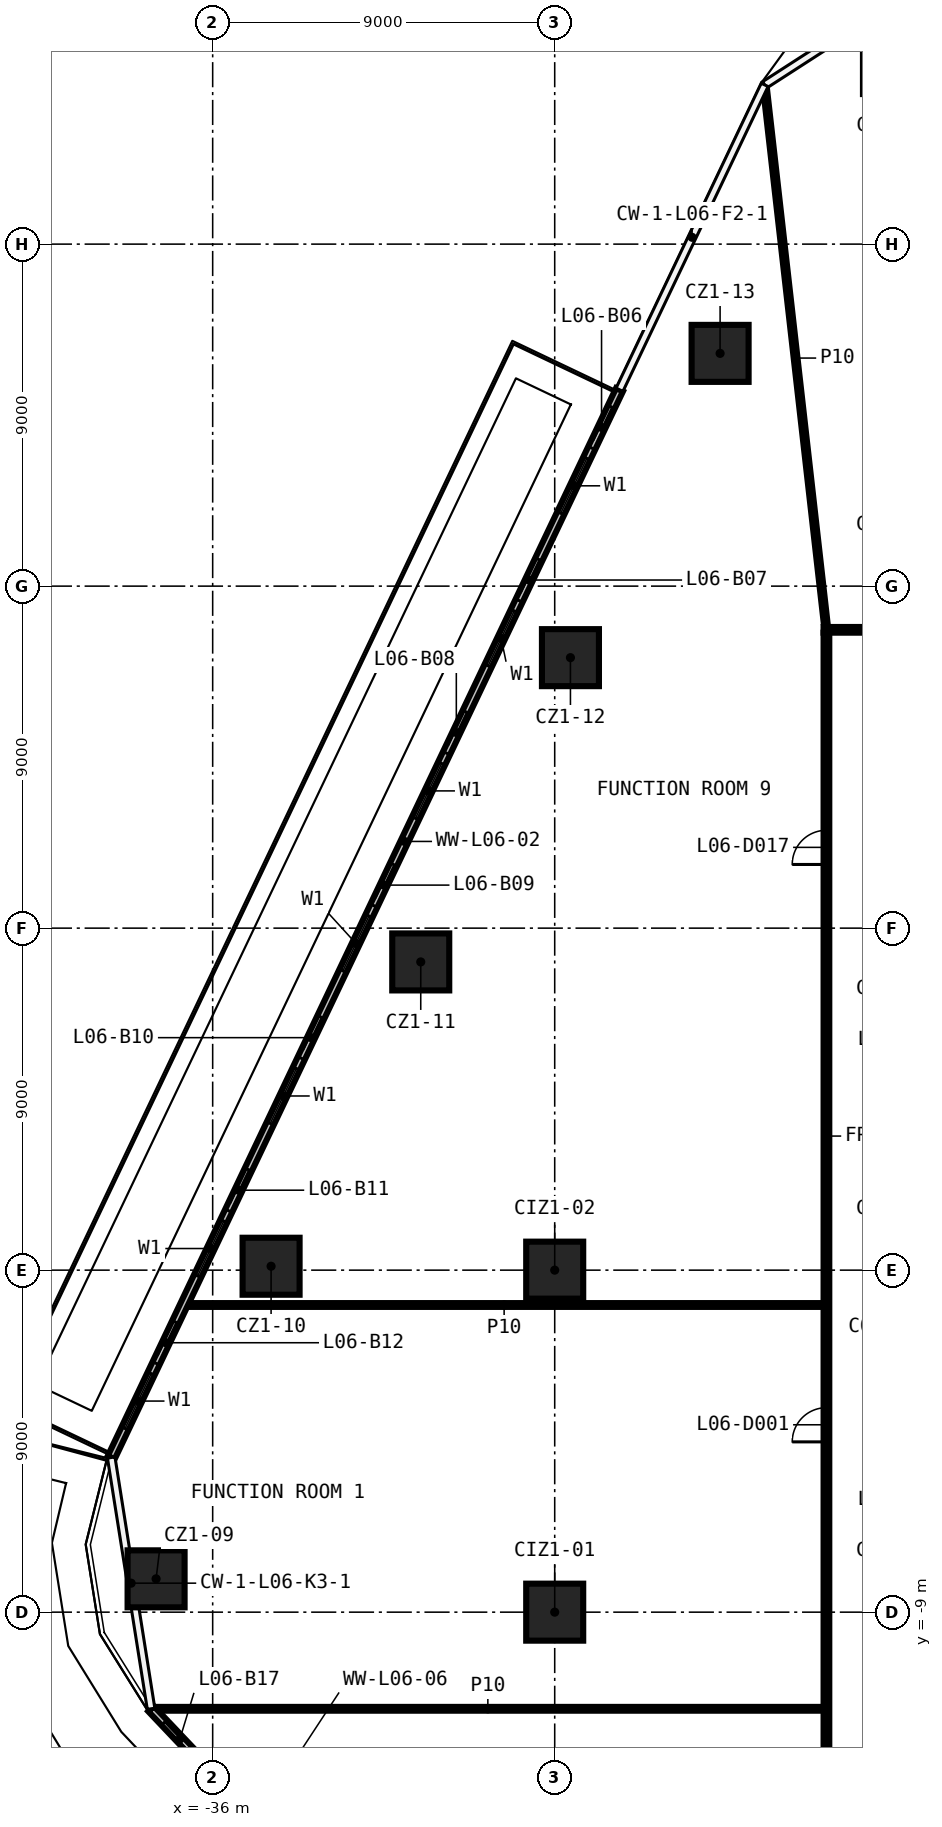
"""IFC4 building model, lengths in metres.
Left out: names, types, materials, properties, quantities, classifications, styles, units other than length and angle.
Written with IfcOpenShell. Run it as: python <this file> out.ifc"""

import sys

from ifc_helpers import new_model, si_unit, direction, frame, frame_2d, origin, origin_2d, place, context, subcontext, project, spatial, rectangle, extrude, element, fill, save


model = new_model("IFC4")
c1 = context("Model", 3, precision=1e-05, world=origin(), true_north=direction((0.0, 1.0)))
c2 = subcontext(c1, "Body", "Model", "MODEL_VIEW")
j1 = project(units=[si_unit("LENGTHUNIT", "METRE"), si_unit("PLANEANGLEUNIT", "RADIAN")], contexts=[c1])
p1 = place(None, origin())
s1 = spatial("IfcSite", under=j1, at=p1, CompositionType="ELEMENT")
p2 = place(p1, origin())
s2 = spatial("IfcBuilding", under=s1, at=p2, CompositionType="ELEMENT")
p3 = place(p2, frame((0.0, 0.0, 44.0)))
s3 = spatial("IfcBuildingStorey", under=s2, at=p3, CompositionType="ELEMENT", Elevation=44.0)
for number, where, z_axis, x_axis in (
    (1, (-37.489, -8.123, 0.0), (0.0, 0.0, 1.0), (1.0, 0.0, 0.0)),
    (2, (-34.463, 0.103, 0.0), (0.0, 0.0, 1.0), (1.0, 0.0, 0.0)),
    (3, (-30.525, 8.111, 0.0), (0.0, 0.0, 1.0), (1.0, 0.0, 0.0)),
    (4, (-26.586, 16.118, 0.0), (0.0, 0.0, 1.0), (1.0, 0.0, 0.0)),
    (5, (-22.648, 24.125, 0.0), (0.0, 0.0, 1.0), (1.0, 0.0, 0.0)),
    (6, (-27.0, -9.0, 0.0), (0.0, 0.0, 1.0), (1.0, 0.0, 0.0)),
    (7, (-27.0, 0.0, 0.0), (0.0, 0.0, 1.0), (1.0, 0.0, 0.0)),
):
    element("IfcColumn", number, at=place(p3, frame(where, z_axis=z_axis, x_axis=x_axis)), inside=s3, PredefinedType="COLUMN", context=c2, shape_type="SweptSolid", body=[
        extrude(rectangle(XDim=1.5, YDim=1.5, at=origin_2d()), origin(), (0.0, 0.0, 1.0), 3.3),
    ])
p4 = place(p3, frame((-37.594, -11.543, 0.0), z_axis=(0.0, 0.0, 1.0), x_axis=(1.0, 0.0, 0.0)))
e8 = element("IfcWall", 8, at=p4, inside=s3, PredefinedType="PARTITIONING", context=c2, shape_type="SweptSolid", body=[
    extrude(rectangle(XDim=17.668, YDim=0.1, at=frame_2d((8.834, 0.0))), origin(), (0.0, 0.0, 1.0), 3.3),
])
p5 = place(p3, frame((-36.737, -0.917, 0.0), z_axis=(0.0, 0.0, 1.0), x_axis=(1.0, 0.0, 0.0)))
e9 = element("IfcWall", 9, at=p5, inside=s3, PredefinedType="PARTITIONING", context=c2, shape_type="SweptSolid", body=[
    extrude(rectangle(XDim=16.812, YDim=0.1, at=frame_2d((8.406, 0.0))), origin(), (0.0, 0.0, 1.0), 3.3),
])
p6 = place(p3, frame((-19.925, 16.85, 0.0), z_axis=(0.0, 0.0, 1.0), x_axis=(1.0, 0.0, 0.0)))
e10 = element("IfcWall", 10, at=p6, inside=s3, PredefinedType="PARTITIONING", context=c2, shape_type="SweptSolid", body=[
    extrude(rectangle(XDim=39.85, YDim=0.15, at=frame_2d((19.925, 0.0))), origin(), (0.0, 0.0, 1.0), 3.3),
])
p7 = place(p6, frame((31.643, 0.0, 0.0)))
e11 = element("IfcOpeningElement", 11, at=p7, cuts=e10, PredefinedType="OPENING", context=c2, shape_type="SweptSolid", body=[
    extrude(rectangle(XDim=0.9, YDim=2.1, at=frame_2d((0.45, 1.05))), frame((0.0, 0.085, 0.0), z_axis=(0.0, -1.0, 0.0), x_axis=(1.0, 0.0, 0.0)), (0.0, 0.0, 1.0), 0.17),
])
p8 = place(p6, frame((22.056, 0.0, 0.0)))
e12 = element("IfcOpeningElement", 12, at=p8, cuts=e10, PredefinedType="OPENING", context=c2, shape_type="SweptSolid", body=[
    extrude(rectangle(XDim=0.9, YDim=2.1, at=frame_2d((0.45, 1.05))), frame((0.0, 0.085, 0.0), z_axis=(0.0, -1.0, 0.0), x_axis=(1.0, 0.0, 0.0)), (0.0, 0.0, 1.0), 0.17),
])
p9 = place(p6, frame((14.831, 0.0, 0.0)))
e13 = element("IfcOpeningElement", 13, at=p9, cuts=e10, PredefinedType="OPENING", context=c2, shape_type="SweptSolid", body=[
    extrude(rectangle(XDim=1.0, YDim=2.1, at=frame_2d((0.5, 1.05))), frame((0.0, 0.085, 0.0), z_axis=(0.0, -1.0, 0.0), x_axis=(1.0, 0.0, 0.0)), (0.0, 0.0, 1.0), 0.17),
])
p10 = place(p3, frame((-19.85, -16.775, 0.0), z_axis=(0.0, 0.0, 1.0), x_axis=(0.0, 1.0, 0.0)))
e14 = element("IfcWall", 14, at=p10, inside=s3, PredefinedType="PARTITIONING", context=c2, shape_type="SweptSolid", body=[
    extrude(rectangle(XDim=33.55, YDim=0.15, at=frame_2d((16.775, 0.0))), origin(), (0.0, 0.0, 1.0), 3.3),
])
p11 = place(p10, frame((12.256, 0.0, 0.0)))
e15 = element("IfcOpeningElement", 15, at=p11, cuts=e14, PredefinedType="OPENING", context=c2, shape_type="SweptSolid", body=[
    extrude(rectangle(XDim=0.9, YDim=2.1, at=frame_2d((0.45, 1.05))), frame((0.0, 0.085, 0.0), z_axis=(0.0, -1.0, 0.0), x_axis=(1.0, 0.0, 0.0)), (0.0, 0.0, 1.0), 0.17),
])
p12 = place(p10, frame((3.254, 0.0, 0.0)))
e16 = element("IfcOpeningElement", 16, at=p12, cuts=e14, PredefinedType="OPENING", context=c2, shape_type="SweptSolid", body=[
    extrude(rectangle(XDim=0.9, YDim=2.1, at=frame_2d((0.45, 1.05))), frame((0.0, 0.085, 0.0), z_axis=(0.0, -1.0, 0.0), x_axis=(1.0, 0.0, 0.0)), (0.0, 0.0, 1.0), 0.17),
])
p13 = place(p10, frame((27.451, 0.0, 0.0)))
e17 = element("IfcOpeningElement", 17, at=p13, cuts=e14, PredefinedType="OPENING", context=c2, shape_type="SweptSolid", body=[
    extrude(rectangle(XDim=0.9, YDim=2.1, at=frame_2d((0.45, 1.05))), frame((0.0, 0.085, 0.0), z_axis=(0.0, -1.0, 0.0), x_axis=(1.0, 0.0, 0.0)), (0.0, 0.0, 1.0), 0.17),
])
p14 = place(p3, frame((-21.472, 31.153, 0.0), z_axis=(0.0, 0.0, 1.0), x_axis=(0.112685540228, -0.993630700524, 0.0)))
e18 = element("IfcWall", 18, at=p14, inside=s3, PredefinedType="PARTITIONING", context=c2, shape_type="SweptSolid", body=[
    extrude(rectangle(XDim=14.395, YDim=0.1, at=frame_2d((7.197, 0.0))), origin(), (0.0, 0.0, 1.0), 3.3),
])
p15 = place(p3, frame((-25.295, 23.168, 0.0), z_axis=(0.0, 0.0, 1.0), x_axis=(-0.429791665344, -0.902928083737, 0.0)))
e19 = element("IfcWall", 19, at=p15, inside=s3, PredefinedType="SOLIDWALL", context=c2, shape_type="SweptSolid", body=[
    extrude(rectangle(XDim=31.12, YDim=0.2, at=frame_2d((15.56, 0.0))), origin(), (0.0, 0.0, 1.0), 3.3),
])
p16 = place(p15, frame((2.0, 0.0, 0.6)))
e20 = element("IfcOpeningElement", 20, at=p16, cuts=e19, PredefinedType="OPENING", context=c2, shape_type="SweptSolid", body=[
    extrude(rectangle(XDim=1.6, YDim=2.4, at=frame_2d((0.8, 1.2))), frame((0.0, 0.11, 0.0), z_axis=(0.0, -1.0, 0.0), x_axis=(1.0, 0.0, 0.0)), (0.0, 0.0, 1.0), 0.22),
])
p17 = place(p15, frame((0.5, 0.0, 0.0)))
e21 = element("IfcOpeningElement", 21, at=p17, cuts=e19, PredefinedType="OPENING", context=c2, shape_type="SweptSolid", body=[
    extrude(rectangle(XDim=1.2, YDim=2.4, at=frame_2d((0.6, 1.2))), frame((0.0, 0.11, 0.0), z_axis=(0.0, -1.0, 0.0), x_axis=(1.0, 0.0, 0.0)), (0.0, 0.0, 1.0), 0.22),
])
p18 = place(p15, frame((6.446, 0.0, 0.6)))
e22 = element("IfcOpeningElement", 22, at=p18, cuts=e19, PredefinedType="OPENING", context=c2, shape_type="SweptSolid", body=[
    extrude(rectangle(XDim=1.6, YDim=2.4, at=frame_2d((0.8, 1.2))), frame((0.0, 0.11, 0.0), z_axis=(0.0, -1.0, 0.0), x_axis=(1.0, 0.0, 0.0)), (0.0, 0.0, 1.0), 0.22),
])
p19 = place(p15, frame((4.946, 0.0, 0.0)))
e23 = element("IfcOpeningElement", 23, at=p19, cuts=e19, PredefinedType="OPENING", context=c2, shape_type="SweptSolid", body=[
    extrude(rectangle(XDim=1.2, YDim=2.4, at=frame_2d((0.6, 1.2))), frame((0.0, 0.11, 0.0), z_axis=(0.0, -1.0, 0.0), x_axis=(1.0, 0.0, 0.0)), (0.0, 0.0, 1.0), 0.22),
])
p20 = place(p15, frame((10.891, 0.0, 0.6)))
e24 = element("IfcOpeningElement", 24, at=p20, cuts=e19, PredefinedType="OPENING", context=c2, shape_type="SweptSolid", body=[
    extrude(rectangle(XDim=1.6, YDim=2.4, at=frame_2d((0.8, 1.2))), frame((0.0, 0.11, 0.0), z_axis=(0.0, -1.0, 0.0), x_axis=(1.0, 0.0, 0.0)), (0.0, 0.0, 1.0), 0.22),
])
p21 = place(p15, frame((9.391, 0.0, 0.0)))
e25 = element("IfcOpeningElement", 25, at=p21, cuts=e19, PredefinedType="OPENING", context=c2, shape_type="SweptSolid", body=[
    extrude(rectangle(XDim=1.2, YDim=2.4, at=frame_2d((0.6, 1.2))), frame((0.0, 0.11, 0.0), z_axis=(0.0, -1.0, 0.0), x_axis=(1.0, 0.0, 0.0)), (0.0, 0.0, 1.0), 0.22),
])
p22 = place(p15, frame((15.337, 0.0, 0.6)))
e26 = element("IfcOpeningElement", 26, at=p22, cuts=e19, PredefinedType="OPENING", context=c2, shape_type="SweptSolid", body=[
    extrude(rectangle(XDim=1.6, YDim=2.4, at=frame_2d((0.8, 1.2))), frame((0.0, 0.11, 0.0), z_axis=(0.0, -1.0, 0.0), x_axis=(1.0, 0.0, 0.0)), (0.0, 0.0, 1.0), 0.22),
])
p23 = place(p15, frame((13.837, 0.0, 0.0)))
e27 = element("IfcOpeningElement", 27, at=p23, cuts=e19, PredefinedType="OPENING", context=c2, shape_type="SweptSolid", body=[
    extrude(rectangle(XDim=1.2, YDim=2.4, at=frame_2d((0.6, 1.2))), frame((0.0, 0.11, 0.0), z_axis=(0.0, -1.0, 0.0), x_axis=(1.0, 0.0, 0.0)), (0.0, 0.0, 1.0), 0.22),
])
p24 = place(p15, frame((19.783, 0.0, 0.6)))
e28 = element("IfcOpeningElement", 28, at=p24, cuts=e19, PredefinedType="OPENING", context=c2, shape_type="SweptSolid", body=[
    extrude(rectangle(XDim=1.6, YDim=2.4, at=frame_2d((0.8, 1.2))), frame((0.0, 0.11, 0.0), z_axis=(0.0, -1.0, 0.0), x_axis=(1.0, 0.0, 0.0)), (0.0, 0.0, 1.0), 0.22),
])
p25 = place(p15, frame((18.283, 0.0, 0.0)))
e29 = element("IfcOpeningElement", 29, at=p25, cuts=e19, PredefinedType="OPENING", context=c2, shape_type="SweptSolid", body=[
    extrude(rectangle(XDim=1.2, YDim=2.4, at=frame_2d((0.6, 1.2))), frame((0.0, 0.11, 0.0), z_axis=(0.0, -1.0, 0.0), x_axis=(1.0, 0.0, 0.0)), (0.0, 0.0, 1.0), 0.22),
])
p26 = place(p15, frame((24.229, 0.0, 0.6)))
e30 = element("IfcOpeningElement", 30, at=p26, cuts=e19, PredefinedType="OPENING", context=c2, shape_type="SweptSolid", body=[
    extrude(rectangle(XDim=1.6, YDim=2.4, at=frame_2d((0.8, 1.2))), frame((0.0, 0.11, 0.0), z_axis=(0.0, -1.0, 0.0), x_axis=(1.0, 0.0, 0.0)), (0.0, 0.0, 1.0), 0.22),
])
p27 = place(p15, frame((22.729, 0.0, 0.0)))
e31 = element("IfcOpeningElement", 31, at=p27, cuts=e19, PredefinedType="OPENING", context=c2, shape_type="SweptSolid", body=[
    extrude(rectangle(XDim=1.2, YDim=2.4, at=frame_2d((0.6, 1.2))), frame((0.0, 0.11, 0.0), z_axis=(0.0, -1.0, 0.0), x_axis=(1.0, 0.0, 0.0)), (0.0, 0.0, 1.0), 0.22),
])
p28 = place(p15, frame((28.674, 0.0, 0.6)))
e32 = element("IfcOpeningElement", 32, at=p28, cuts=e19, PredefinedType="OPENING", context=c2, shape_type="SweptSolid", body=[
    extrude(rectangle(XDim=1.6, YDim=2.4, at=frame_2d((0.8, 1.2))), frame((0.0, 0.11, 0.0), z_axis=(0.0, -1.0, 0.0), x_axis=(1.0, 0.0, 0.0)), (0.0, 0.0, 1.0), 0.22),
])
p29 = place(p15, frame((27.174, 0.0, 0.0)))
e33 = element("IfcOpeningElement", 33, at=p29, cuts=e19, PredefinedType="OPENING", context=c2, shape_type="SweptSolid", body=[
    extrude(rectangle(XDim=1.2, YDim=2.4, at=frame_2d((0.6, 1.2))), frame((0.0, 0.11, 0.0), z_axis=(0.0, -1.0, 0.0), x_axis=(1.0, 0.0, 0.0)), (0.0, 0.0, 1.0), 0.22),
])
p30 = place(p3, frame((-37.621, -11.543, 0.0), z_axis=(0.0, 0.0, 1.0), x_axis=(0.688100005166, -0.725615864553, 0.0)))
e34 = element("IfcWall", 34, at=p30, inside=s3, PredefinedType="SOLIDWALL", context=c2, shape_type="SweptSolid", body=[
    extrude(rectangle(XDim=4.21, YDim=0.2, at=frame_2d((2.105, 0.0))), origin(), (0.0, 0.0, 1.0), 3.3),
])
p31 = place(p30, frame((2.0, 0.0, 0.6)))
e35 = element("IfcOpeningElement", 35, at=p31, cuts=e34, PredefinedType="OPENING", context=c2, shape_type="SweptSolid", body=[
    extrude(rectangle(XDim=1.6, YDim=2.4, at=frame_2d((0.8, 1.2))), frame((0.0, 0.11, 0.0), z_axis=(0.0, -1.0, 0.0), x_axis=(1.0, 0.0, 0.0)), (0.0, 0.0, 1.0), 0.22),
])
p32 = place(p30, frame((0.5, 0.0, 0.0)))
e36 = element("IfcOpeningElement", 36, at=p32, cuts=e34, PredefinedType="OPENING", context=c2, shape_type="SweptSolid", body=[
    extrude(rectangle(XDim=1.2, YDim=2.4, at=frame_2d((0.6, 1.2))), frame((0.0, 0.11, 0.0), z_axis=(0.0, -1.0, 0.0), x_axis=(1.0, 0.0, 0.0)), (0.0, 0.0, 1.0), 0.22),
])
p33 = place(p11, origin())
e37 = element("IfcDoor", 37, at=p33, inside=s3, OperationType="SINGLE_SWING_RIGHT", PredefinedType="DOOR", context=c2, shape_type="SweptSolid", body=[
    extrude(rectangle(XDim=0.9, YDim=2.1, at=frame_2d((0.45, 1.05))), frame((0.0, 0.025, 0.0), z_axis=(0.0, -1.0, 0.0), x_axis=(1.0, 0.0, 0.0)), (0.0, 0.0, 1.0), 0.05),
])
fill(e15, e37)
p34 = place(p13, origin())
e38 = element("IfcDoor", 38, at=p34, inside=s3, OperationType="SINGLE_SWING_LEFT", PredefinedType="DOOR", context=c2, shape_type="SweptSolid", body=[
    extrude(rectangle(XDim=0.9, YDim=2.1, at=frame_2d((0.45, 1.05))), frame((0.0, 0.025, 0.0), z_axis=(0.0, -1.0, 0.0), x_axis=(1.0, 0.0, 0.0)), (0.0, 0.0, 1.0), 0.05),
])
fill(e17, e38)
p35 = place(p16, origin())
e39 = element("IfcWindow", 39, at=p35, inside=s3, PartitioningType="SINGLE_PANEL", PredefinedType="WINDOW", context=c2, shape_type="SweptSolid", body=[
    extrude(rectangle(XDim=1.6, YDim=2.4, at=frame_2d((0.8, 1.2))), frame((0.0, 0.03, 0.0), z_axis=(0.0, -1.0, 0.0), x_axis=(1.0, 0.0, 0.0)), (0.0, 0.0, 1.0), 0.06),
])
fill(e20, e39)
p36 = place(p17, origin())
e40 = element("IfcDoor", 40, at=p36, inside=s3, OperationType="SLIDING_TO_LEFT", PredefinedType="DOOR", context=c2, shape_type="SweptSolid", body=[
    extrude(rectangle(XDim=1.2, YDim=2.4, at=frame_2d((0.6, 1.2))), frame((0.0, 0.025, 0.0), z_axis=(0.0, -1.0, 0.0), x_axis=(1.0, 0.0, 0.0)), (0.0, 0.0, 1.0), 0.05),
])
fill(e21, e40)
p37 = place(p18, origin())
e41 = element("IfcWindow", 41, at=p37, inside=s3, PartitioningType="SINGLE_PANEL", PredefinedType="WINDOW", context=c2, shape_type="SweptSolid", body=[
    extrude(rectangle(XDim=1.6, YDim=2.4, at=frame_2d((0.8, 1.2))), frame((0.0, 0.03, 0.0), z_axis=(0.0, -1.0, 0.0), x_axis=(1.0, 0.0, 0.0)), (0.0, 0.0, 1.0), 0.06),
])
fill(e22, e41)
p38 = place(p19, origin())
e42 = element("IfcDoor", 42, at=p38, inside=s3, OperationType="SLIDING_TO_LEFT", PredefinedType="DOOR", context=c2, shape_type="SweptSolid", body=[
    extrude(rectangle(XDim=1.2, YDim=2.4, at=frame_2d((0.6, 1.2))), frame((0.0, 0.025, 0.0), z_axis=(0.0, -1.0, 0.0), x_axis=(1.0, 0.0, 0.0)), (0.0, 0.0, 1.0), 0.05),
])
fill(e23, e42)
p39 = place(p20, origin())
e43 = element("IfcWindow", 43, at=p39, inside=s3, PartitioningType="SINGLE_PANEL", PredefinedType="WINDOW", context=c2, shape_type="SweptSolid", body=[
    extrude(rectangle(XDim=1.6, YDim=2.4, at=frame_2d((0.8, 1.2))), frame((0.0, 0.03, 0.0), z_axis=(0.0, -1.0, 0.0), x_axis=(1.0, 0.0, 0.0)), (0.0, 0.0, 1.0), 0.06),
])
fill(e24, e43)
p40 = place(p21, origin())
e44 = element("IfcDoor", 44, at=p40, inside=s3, OperationType="SLIDING_TO_LEFT", PredefinedType="DOOR", context=c2, shape_type="SweptSolid", body=[
    extrude(rectangle(XDim=1.2, YDim=2.4, at=frame_2d((0.6, 1.2))), frame((0.0, 0.025, 0.0), z_axis=(0.0, -1.0, 0.0), x_axis=(1.0, 0.0, 0.0)), (0.0, 0.0, 1.0), 0.05),
])
fill(e25, e44)
p41 = place(p22, origin())
e45 = element("IfcWindow", 45, at=p41, inside=s3, PartitioningType="SINGLE_PANEL", PredefinedType="WINDOW", context=c2, shape_type="SweptSolid", body=[
    extrude(rectangle(XDim=1.6, YDim=2.4, at=frame_2d((0.8, 1.2))), frame((0.0, 0.03, 0.0), z_axis=(0.0, -1.0, 0.0), x_axis=(1.0, 0.0, 0.0)), (0.0, 0.0, 1.0), 0.06),
])
fill(e26, e45)
p42 = place(p23, origin())
e46 = element("IfcDoor", 46, at=p42, inside=s3, OperationType="SLIDING_TO_LEFT", PredefinedType="DOOR", context=c2, shape_type="SweptSolid", body=[
    extrude(rectangle(XDim=1.2, YDim=2.4, at=frame_2d((0.6, 1.2))), frame((0.0, 0.025, 0.0), z_axis=(0.0, -1.0, 0.0), x_axis=(1.0, 0.0, 0.0)), (0.0, 0.0, 1.0), 0.05),
])
fill(e27, e46)
p43 = place(p24, origin())
e47 = element("IfcWindow", 47, at=p43, inside=s3, PartitioningType="SINGLE_PANEL", PredefinedType="WINDOW", context=c2, shape_type="SweptSolid", body=[
    extrude(rectangle(XDim=1.6, YDim=2.4, at=frame_2d((0.8, 1.2))), frame((0.0, 0.03, 0.0), z_axis=(0.0, -1.0, 0.0), x_axis=(1.0, 0.0, 0.0)), (0.0, 0.0, 1.0), 0.06),
])
fill(e28, e47)
p44 = place(p25, origin())
e48 = element("IfcDoor", 48, at=p44, inside=s3, OperationType="SLIDING_TO_LEFT", PredefinedType="DOOR", context=c2, shape_type="SweptSolid", body=[
    extrude(rectangle(XDim=1.2, YDim=2.4, at=frame_2d((0.6, 1.2))), frame((0.0, 0.025, 0.0), z_axis=(0.0, -1.0, 0.0), x_axis=(1.0, 0.0, 0.0)), (0.0, 0.0, 1.0), 0.05),
])
fill(e29, e48)
p45 = place(p26, origin())
e49 = element("IfcWindow", 49, at=p45, inside=s3, PartitioningType="SINGLE_PANEL", PredefinedType="WINDOW", context=c2, shape_type="SweptSolid", body=[
    extrude(rectangle(XDim=1.6, YDim=2.4, at=frame_2d((0.8, 1.2))), frame((0.0, 0.03, 0.0), z_axis=(0.0, -1.0, 0.0), x_axis=(1.0, 0.0, 0.0)), (0.0, 0.0, 1.0), 0.06),
])
fill(e30, e49)
p46 = place(p27, origin())
e50 = element("IfcDoor", 50, at=p46, inside=s3, OperationType="SLIDING_TO_LEFT", PredefinedType="DOOR", context=c2, shape_type="SweptSolid", body=[
    extrude(rectangle(XDim=1.2, YDim=2.4, at=frame_2d((0.6, 1.2))), frame((0.0, 0.025, 0.0), z_axis=(0.0, -1.0, 0.0), x_axis=(1.0, 0.0, 0.0)), (0.0, 0.0, 1.0), 0.05),
])
fill(e31, e50)
p47 = place(p28, origin())
e51 = element("IfcWindow", 51, at=p47, inside=s3, PartitioningType="SINGLE_PANEL", PredefinedType="WINDOW", context=c2, shape_type="SweptSolid", body=[
    extrude(rectangle(XDim=1.6, YDim=2.4, at=frame_2d((0.8, 1.2))), frame((0.0, 0.03, 0.0), z_axis=(0.0, -1.0, 0.0), x_axis=(1.0, 0.0, 0.0)), (0.0, 0.0, 1.0), 0.06),
])
fill(e32, e51)
p48 = place(p29, origin())
e52 = element("IfcDoor", 52, at=p48, inside=s3, OperationType="SLIDING_TO_LEFT", PredefinedType="DOOR", context=c2, shape_type="SweptSolid", body=[
    extrude(rectangle(XDim=1.2, YDim=2.4, at=frame_2d((0.6, 1.2))), frame((0.0, 0.025, 0.0), z_axis=(0.0, -1.0, 0.0), x_axis=(1.0, 0.0, 0.0)), (0.0, 0.0, 1.0), 0.05),
])
fill(e33, e52)
p49 = place(p32, origin())
e53 = element("IfcDoor", 53, at=p49, inside=s3, OperationType="SLIDING_TO_LEFT", PredefinedType="DOOR", context=c2, shape_type="SweptSolid", body=[
    extrude(rectangle(XDim=1.2, YDim=2.4, at=frame_2d((0.6, 1.2))), frame((0.0, 0.025, 0.0), z_axis=(0.0, -1.0, 0.0), x_axis=(1.0, 0.0, 0.0)), (0.0, 0.0, 1.0), 0.05),
])
fill(e36, e53)
save(model, sys.argv[1])
